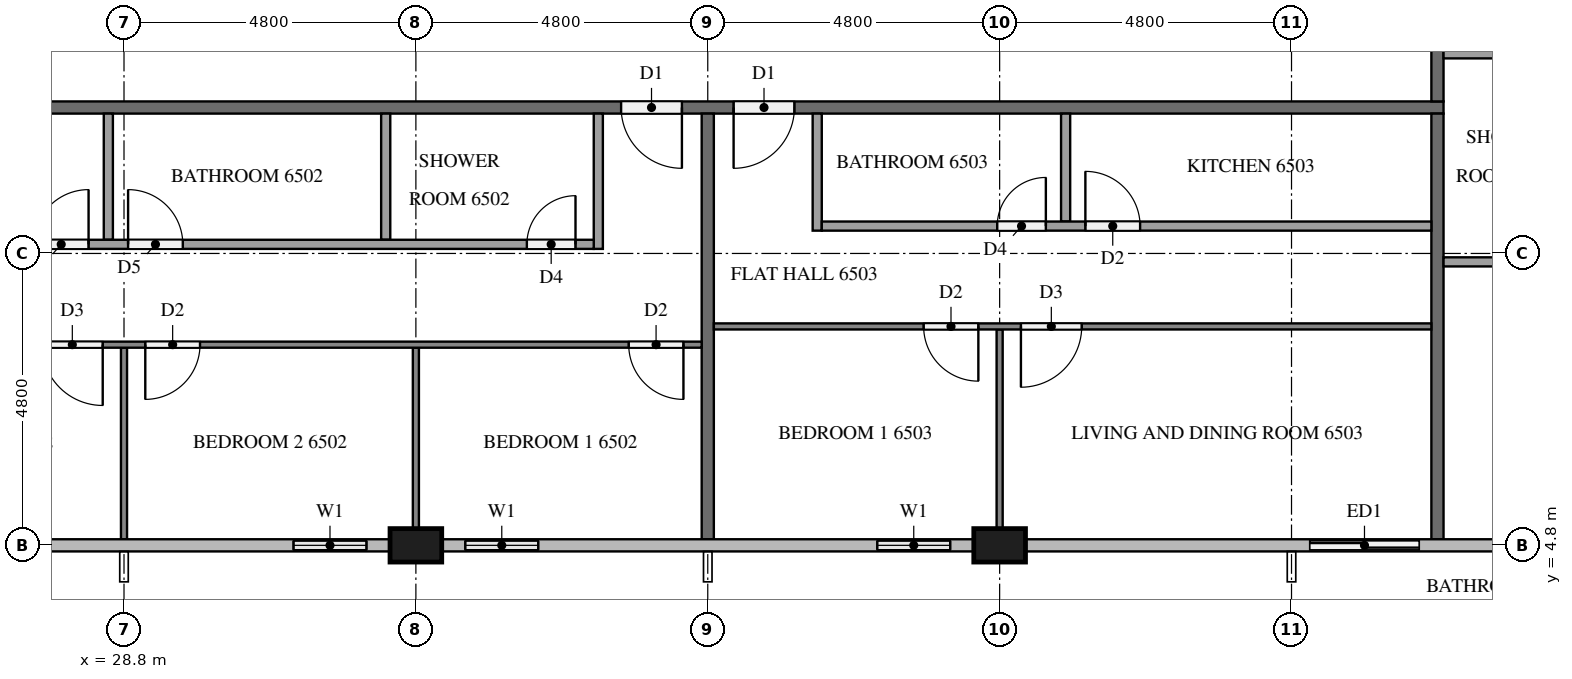
"""IFC4 building model, lengths in metres.
Left out: names, types, materials, properties, quantities, classifications, styles, units other than length and angle.
Written with IfcOpenShell. Run it as: python <this file> out.ifc"""

import sys

from ifc_helpers import new_model, si_unit, direction, frame, frame_2d, origin, origin_2d, place, context, subcontext, project, spatial, rectangle, extrude, element, fill, save


model = new_model("IFC4")
c1 = context("Model", 3, precision=1e-05, world=origin(), true_north=direction((0.0, 1.0)))
c2 = subcontext(c1, "Body", "Model", "MODEL_VIEW")
j1 = project(units=[si_unit("LENGTHUNIT", "METRE"), si_unit("PLANEANGLEUNIT", "RADIAN")], contexts=[c1])
p1 = place(None, origin())
s1 = spatial("IfcSite", under=j1, at=p1, CompositionType="ELEMENT")
p2 = place(p1, origin())
s2 = spatial("IfcBuilding", under=s1, at=p2, CompositionType="ELEMENT")
p3 = place(p2, frame((0.0, 0.0, 249.2)))
s3 = spatial("IfcBuildingStorey", under=s2, at=p3, CompositionType="ELEMENT", Elevation=249.2)
for number, where, z_axis, x_axis in (
    (1, (33.6, 4.8, 0.0), (0.0, 0.0, 1.0), (1.0, 0.0, 0.0)),
    (2, (43.2, 4.8, 0.0), (0.0, 0.0, 1.0), (1.0, 0.0, 0.0)),
):
    element("IfcColumn", number, at=place(p3, frame(where, z_axis=z_axis, x_axis=x_axis)), inside=s3, PredefinedType="COLUMN", context=c2, shape_type="SweptSolid", body=[
        extrude(rectangle(XDim=0.85, YDim=0.55, at=origin_2d()), origin(), (0.0, 0.0, 1.0), 3.2),
    ])
p4 = place(p3, frame((31.2, 4.8, 0.0), z_axis=(0.0, 0.0, 1.0), x_axis=(1.0, 0.0, 0.0)))
e3 = element("IfcWall", 3, at=p4, inside=s3, PredefinedType="SOLIDWALL", context=c2, shape_type="SweptSolid", body=[
    extrude(rectangle(XDim=1.975, YDim=0.15, at=frame_2d((0.988, 0.0))), origin(), (0.0, 0.0, 1.0), 3.2),
])
p5 = place(p4, frame((0.387, 0.0, 0.9)))
e4 = element("IfcOpeningElement", 4, at=p5, cuts=e3, PredefinedType="OPENING", context=c2, shape_type="SweptSolid", body=[
    extrude(rectangle(XDim=1.2, YDim=1.4, at=frame_2d((0.6, 0.7))), frame((0.0, 0.085, 0.0), z_axis=(0.0, -1.0, 0.0), x_axis=(1.0, 0.0, 0.0)), (0.0, 0.0, 1.0), 0.17),
])
p6 = place(p3, frame((34.025, 4.8, 0.0), z_axis=(0.0, 0.0, 1.0), x_axis=(1.0, 0.0, 0.0)))
e5 = element("IfcWall", 5, at=p6, inside=s3, PredefinedType="SOLIDWALL", context=c2, shape_type="SweptSolid", body=[
    extrude(rectangle(XDim=1.975, YDim=0.15, at=frame_2d((0.988, 0.0))), origin(), (0.0, 0.0, 1.0), 3.2),
])
p7 = place(p6, frame((0.387, 0.0, 0.9)))
e6 = element("IfcOpeningElement", 6, at=p7, cuts=e5, PredefinedType="OPENING", context=c2, shape_type="SweptSolid", body=[
    extrude(rectangle(XDim=1.2, YDim=1.4, at=frame_2d((0.6, 0.7))), frame((0.0, 0.085, 0.0), z_axis=(0.0, -1.0, 0.0), x_axis=(1.0, 0.0, 0.0)), (0.0, 0.0, 1.0), 0.17),
])
p8 = place(p3, frame((40.8, 4.8, 0.0), z_axis=(0.0, 0.0, 1.0), x_axis=(1.0, 0.0, 0.0)))
e7 = element("IfcWall", 7, at=p8, inside=s3, PredefinedType="SOLIDWALL", context=c2, shape_type="SweptSolid", body=[
    extrude(rectangle(XDim=1.975, YDim=0.15, at=frame_2d((0.987, 0.0))), origin(), (0.0, 0.0, 1.0), 3.2),
])
p9 = place(p8, frame((0.387, 0.0, 0.9)))
e8 = element("IfcOpeningElement", 8, at=p9, cuts=e7, PredefinedType="OPENING", context=c2, shape_type="SweptSolid", body=[
    extrude(rectangle(XDim=1.2, YDim=1.4, at=frame_2d((0.6, 0.7))), frame((0.0, 0.085, 0.0), z_axis=(0.0, -1.0, 0.0), x_axis=(1.0, 0.0, 0.0)), (0.0, 0.0, 1.0), 0.17),
])
p10 = place(p3, frame((48.0, 4.8, 0.0), z_axis=(0.0, 0.0, 1.0), x_axis=(1.0, 0.0, 0.0)))
e9 = element("IfcWall", 9, at=p10, inside=s3, PredefinedType="SOLIDWALL", context=c2, shape_type="SweptSolid", body=[
    extrude(rectangle(XDim=2.4, YDim=0.15, at=frame_2d((1.2, 0.0))), origin(), (0.0, 0.0, 1.0), 3.2),
])
p11 = place(p10, frame((0.3, 0.0, 0.0)))
e10 = element("IfcOpeningElement", 10, at=p11, cuts=e9, PredefinedType="OPENING", context=c2, shape_type="SweptSolid", body=[
    extrude(rectangle(XDim=1.8, YDim=2.4, at=frame_2d((0.9, 1.2))), frame((0.0, 0.085, 0.0), z_axis=(0.0, -1.0, 0.0), x_axis=(1.0, 0.0, 0.0)), (0.0, 0.0, 1.0), 0.17),
])
p12 = place(p3, frame((50.5, 12.0, 0.0), z_axis=(0.0, 0.0, 1.0), x_axis=(-1.0, 0.0, 0.0)))
e11 = element("IfcWall", 11, at=p12, inside=s3, PredefinedType="PARTITIONING", context=c2, shape_type="SweptSolid", body=[
    extrude(rectangle(XDim=38.6, YDim=0.2, at=frame_2d((19.3, 0.0))), origin(), (0.0, 0.0, 1.0), 3.2),
])
p13 = place(p12, frame((37.075, 0.0, 0.0)))
e12 = element("IfcOpeningElement", 12, at=p13, cuts=e11, PredefinedType="OPENING", context=c2, shape_type="SweptSolid", body=[
    extrude(rectangle(XDim=1.0, YDim=2.1, at=frame_2d((0.5, 1.05))), frame((0.0, 0.11, 0.0), z_axis=(0.0, -1.0, 0.0), x_axis=(1.0, 0.0, 0.0)), (0.0, 0.0, 1.0), 0.22),
])
p14 = place(p12, frame((12.525, 0.0, 0.0)))
e13 = element("IfcOpeningElement", 13, at=p14, cuts=e11, PredefinedType="OPENING", context=c2, shape_type="SweptSolid", body=[
    extrude(rectangle(XDim=1.0, YDim=2.1, at=frame_2d((0.5, 1.05))), frame((0.0, 0.11, 0.0), z_axis=(0.0, -1.0, 0.0), x_axis=(1.0, 0.0, 0.0)), (0.0, 0.0, 1.0), 0.22),
])
p15 = place(p12, frame((10.675, 0.0, 0.0)))
e14 = element("IfcOpeningElement", 14, at=p15, cuts=e11, PredefinedType="OPENING", context=c2, shape_type="SweptSolid", body=[
    extrude(rectangle(XDim=1.0, YDim=2.1, at=frame_2d((0.5, 1.05))), frame((0.0, 0.11, 0.0), z_axis=(0.0, -1.0, 0.0), x_axis=(1.0, 0.0, 0.0)), (0.0, 0.0, 1.0), 0.22),
])
p16 = place(p3, frame((50.4, 40.7, 0.0), z_axis=(0.0, 0.0, 1.0), x_axis=(0.0, -1.0, 0.0)))
e15 = element("IfcWall", 15, at=p16, inside=s3, PredefinedType="PARTITIONING", context=c2, shape_type="SweptSolid", body=[
    extrude(rectangle(XDim=28.6, YDim=0.2, at=frame_2d((14.3, 0.0))), origin(), (0.0, 0.0, 1.0), 3.2),
])
p17 = place(p16, frame((19.525, 0.0, 0.0)))
e16 = element("IfcOpeningElement", 16, at=p17, cuts=e15, PredefinedType="OPENING", context=c2, shape_type="SweptSolid", body=[
    extrude(rectangle(XDim=1.0, YDim=2.1, at=frame_2d((0.5, 1.05))), frame((0.0, 0.11, 0.0), z_axis=(0.0, -1.0, 0.0), x_axis=(1.0, 0.0, 0.0)), (0.0, 0.0, 1.0), 0.22),
])
p18 = place(p16, frame((17.675, 0.0, 0.0)))
e17 = element("IfcOpeningElement", 17, at=p18, cuts=e15, PredefinedType="OPENING", context=c2, shape_type="SweptSolid", body=[
    extrude(rectangle(XDim=1.0, YDim=2.1, at=frame_2d((0.5, 1.05))), frame((0.0, 0.11, 0.0), z_axis=(0.0, -1.0, 0.0), x_axis=(1.0, 0.0, 0.0)), (0.0, 0.0, 1.0), 0.22),
])
p19 = place(p16, frame((0.325, 0.0, 0.0)))
e18 = element("IfcOpeningElement", 18, at=p19, cuts=e15, PredefinedType="OPENING", context=c2, shape_type="SweptSolid", body=[
    extrude(rectangle(XDim=1.0, YDim=2.1, at=frame_2d((0.5, 1.05))), frame((0.0, 0.11, 0.0), z_axis=(0.0, -1.0, 0.0), x_axis=(1.0, 0.0, 0.0)), (0.0, 0.0, 1.0), 0.22),
])
for number, where, z_axis, x_axis in (
    (19, (38.4, 11.9, 0.0), (0.0, 0.0, 1.0), (0.0, -1.0, 0.0)),
    (20, (50.4, 11.9, 0.0), (0.0, 0.0, 1.0), (0.0, -1.0, 0.0)),
):
    element("IfcWall", number, at=place(p3, frame(where, z_axis=z_axis, x_axis=x_axis)), inside=s3, PredefinedType="PARTITIONING", context=c2, shape_type="SweptSolid", body=[
        extrude(rectangle(XDim=7.0, YDim=0.2, at=frame_2d((3.5, 0.0))), origin(), (0.0, 0.0, 1.0), 3.2),
    ])
p20 = place(p3, frame((33.6, 8.05, 0.0), z_axis=(0.0, 0.0, 1.0), x_axis=(0.0, -1.0, 0.0)))
e21 = element("IfcWall", 21, at=p20, inside=s3, PredefinedType="PARTITIONING", context=c2, shape_type="SweptSolid", body=[
    extrude(rectangle(XDim=2.975, YDim=0.1, at=frame_2d((1.488, 0.0))), origin(), (0.0, 0.0, 1.0), 3.2),
])
p21 = place(p3, frame((28.8, 8.05, 0.0), z_axis=(0.0, 0.0, 1.0), x_axis=(0.0, -1.0, 0.0)))
e22 = element("IfcWall", 22, at=p21, inside=s3, PredefinedType="PARTITIONING", context=c2, shape_type="SweptSolid", body=[
    extrude(rectangle(XDim=3.15, YDim=0.1, at=frame_2d((1.575, 0.0))), origin(), (0.0, 0.0, 1.0), 3.2),
])
p22 = place(p3, frame((38.3, 8.1, 0.0), z_axis=(0.0, 0.0, 1.0), x_axis=(-1.0, 0.0, 0.0)))
e23 = element("IfcWall", 23, at=p22, inside=s3, PredefinedType="PARTITIONING", context=c2, shape_type="SweptSolid", body=[
    extrude(rectangle(XDim=16.6, YDim=0.1, at=frame_2d((8.3, 0.0))), origin(), (0.0, 0.0, 1.0), 3.2),
])
p23 = place(p22, frame((0.3, 0.0, 0.0)))
e24 = element("IfcOpeningElement", 24, at=p23, cuts=e23, PredefinedType="OPENING", context=c2, shape_type="SweptSolid", body=[
    extrude(rectangle(XDim=0.9, YDim=2.1, at=frame_2d((0.45, 1.05))), frame((0.0, 0.06, 0.0), z_axis=(0.0, -1.0, 0.0), x_axis=(1.0, 0.0, 0.0)), (0.0, 0.0, 1.0), 0.12),
])
p24 = place(p22, frame((8.25, 0.0, 0.0)))
e25 = element("IfcOpeningElement", 25, at=p24, cuts=e23, PredefinedType="OPENING", context=c2, shape_type="SweptSolid", body=[
    extrude(rectangle(XDim=0.9, YDim=2.1, at=frame_2d((0.45, 1.05))), frame((0.0, 0.06, 0.0), z_axis=(0.0, -1.0, 0.0), x_axis=(1.0, 0.0, 0.0)), (0.0, 0.0, 1.0), 0.12),
])
p25 = place(p22, frame((9.85, 0.0, 0.0)))
e26 = element("IfcOpeningElement", 26, at=p25, cuts=e23, PredefinedType="OPENING", context=c2, shape_type="SweptSolid", body=[
    extrude(rectangle(XDim=1.0, YDim=2.1, at=frame_2d((0.5, 1.05))), frame((0.0, 0.06, 0.0), z_axis=(0.0, -1.0, 0.0), x_axis=(1.0, 0.0, 0.0)), (0.0, 0.0, 1.0), 0.12),
])
for number, where, z_axis, x_axis in (
    (27, (33.104, 11.9, 0.0), (0.0, 0.0, 1.0), (0.0, -1.0, 0.0)),
    (28, (28.542, 11.9, 0.0), (0.0, 0.0, 1.0), (0.0, -1.0, 0.0)),
):
    element("IfcWall", number, at=place(p3, frame(where, z_axis=z_axis, x_axis=x_axis)), inside=s3, PredefinedType="PARTITIONING", context=c2, shape_type="SweptSolid", body=[
        extrude(rectangle(XDim=2.075, YDim=0.15, at=frame_2d((1.038, 0.0))), origin(), (0.0, 0.0, 1.0), 3.2),
    ])
p26 = place(p3, frame((36.6, 11.9, 0.0), z_axis=(0.0, 0.0, 1.0), x_axis=(0.0, -1.0, 0.0)))
e29 = element("IfcWall", 29, at=p26, inside=s3, PredefinedType="PARTITIONING", context=c2, shape_type="SweptSolid", body=[
    extrude(rectangle(XDim=2.225, YDim=0.15, at=frame_2d((1.112, 0.0))), origin(), (0.0, 0.0, 1.0), 3.2),
])
p27 = place(p3, frame((21.7, 9.75, 0.0), z_axis=(0.0, 0.0, 1.0), x_axis=(1.0, 0.0, 0.0)))
e30 = element("IfcWall", 30, at=p27, inside=s3, PredefinedType="PARTITIONING", context=c2, shape_type="SweptSolid", body=[
    extrude(rectangle(XDim=14.825, YDim=0.15, at=frame_2d((7.413, 0.0))), origin(), (0.0, 0.0, 1.0), 3.2),
])
p28 = place(p27, frame((13.725, 0.0, 0.0)))
e31 = element("IfcOpeningElement", 31, at=p28, cuts=e30, PredefinedType="OPENING", context=c2, shape_type="SweptSolid", body=[
    extrude(rectangle(XDim=0.8, YDim=2.1, at=frame_2d((0.4, 1.05))), frame((0.0, 0.085, 0.0), z_axis=(0.0, -1.0, 0.0), x_axis=(1.0, 0.0, 0.0)), (0.0, 0.0, 1.0), 0.17),
])
p29 = place(p27, frame((7.167, 0.0, 0.0)))
e32 = element("IfcOpeningElement", 32, at=p29, cuts=e30, PredefinedType="OPENING", context=c2, shape_type="SweptSolid", body=[
    extrude(rectangle(XDim=0.9, YDim=2.1, at=frame_2d((0.45, 1.05))), frame((0.0, 0.085, 0.0), z_axis=(0.0, -1.0, 0.0), x_axis=(1.0, 0.0, 0.0)), (0.0, 0.0, 1.0), 0.17),
])
p30 = place(p27, frame((5.617, 0.0, 0.0)))
e33 = element("IfcOpeningElement", 33, at=p30, cuts=e30, PredefinedType="OPENING", context=c2, shape_type="SweptSolid", body=[
    extrude(rectangle(XDim=0.9, YDim=2.1, at=frame_2d((0.45, 1.05))), frame((0.0, 0.085, 0.0), z_axis=(0.0, -1.0, 0.0), x_axis=(1.0, 0.0, 0.0)), (0.0, 0.0, 1.0), 0.17),
])
p31 = place(p3, frame((43.2, 8.35, 0.0), z_axis=(0.0, 0.0, 1.0), x_axis=(0.0, -1.0, 0.0)))
e34 = element("IfcWall", 34, at=p31, inside=s3, PredefinedType="PARTITIONING", context=c2, shape_type="SweptSolid", body=[
    extrude(rectangle(XDim=3.275, YDim=0.1, at=frame_2d((1.638, 0.0))), origin(), (0.0, 0.0, 1.0), 3.2),
])
p32 = place(p3, frame((50.3, 8.4, 0.0), z_axis=(0.0, 0.0, 1.0), x_axis=(-1.0, 0.0, 0.0)))
e35 = element("IfcWall", 35, at=p32, inside=s3, PredefinedType="PARTITIONING", context=c2, shape_type="SweptSolid", body=[
    extrude(rectangle(XDim=11.8, YDim=0.1, at=frame_2d((5.9, 0.0))), origin(), (0.0, 0.0, 1.0), 3.2),
])
p33 = place(p32, frame((7.45, 0.0, 0.0)))
e36 = element("IfcOpeningElement", 36, at=p33, cuts=e35, PredefinedType="OPENING", context=c2, shape_type="SweptSolid", body=[
    extrude(rectangle(XDim=0.9, YDim=2.1, at=frame_2d((0.45, 1.05))), frame((0.0, 0.06, 0.0), z_axis=(0.0, -1.0, 0.0), x_axis=(1.0, 0.0, 0.0)), (0.0, 0.0, 1.0), 0.12),
])
p34 = place(p32, frame((5.75, 0.0, 0.0)))
e37 = element("IfcOpeningElement", 37, at=p34, cuts=e35, PredefinedType="OPENING", context=c2, shape_type="SweptSolid", body=[
    extrude(rectangle(XDim=1.0, YDim=2.1, at=frame_2d((0.5, 1.05))), frame((0.0, 0.06, 0.0), z_axis=(0.0, -1.0, 0.0), x_axis=(1.0, 0.0, 0.0)), (0.0, 0.0, 1.0), 0.12),
])
p35 = place(p3, frame((44.285, 11.9, 0.0), z_axis=(0.0, 0.0, 1.0), x_axis=(0.0, -1.0, 0.0)))
e38 = element("IfcWall", 38, at=p35, inside=s3, PredefinedType="PARTITIONING", context=c2, shape_type="SweptSolid", body=[
    extrude(rectangle(XDim=1.775, YDim=0.15, at=frame_2d((0.887, 0.0))), origin(), (0.0, 0.0, 1.0), 3.2),
])
p36 = place(p3, frame((40.2, 11.9, 0.0), z_axis=(0.0, 0.0, 1.0), x_axis=(0.0, -1.0, 0.0)))
e39 = element("IfcWall", 39, at=p36, inside=s3, PredefinedType="PARTITIONING", context=c2, shape_type="SweptSolid", body=[
    extrude(rectangle(XDim=1.925, YDim=0.15, at=frame_2d((0.962, 0.0))), origin(), (0.0, 0.0, 1.0), 3.2),
])
p37 = place(p3, frame((40.275, 10.05, 0.0), z_axis=(0.0, 0.0, 1.0), x_axis=(1.0, 0.0, 0.0)))
e40 = element("IfcWall", 40, at=p37, inside=s3, PredefinedType="PARTITIONING", context=c2, shape_type="SweptSolid", body=[
    extrude(rectangle(XDim=10.025, YDim=0.15, at=frame_2d((5.013, 0.0))), origin(), (0.0, 0.0, 1.0), 3.2),
])
p38 = place(p37, frame((2.885, 0.0, 0.0)))
e41 = element("IfcOpeningElement", 41, at=p38, cuts=e40, PredefinedType="OPENING", context=c2, shape_type="SweptSolid", body=[
    extrude(rectangle(XDim=0.8, YDim=2.1, at=frame_2d((0.4, 1.05))), frame((0.0, 0.085, 0.0), z_axis=(0.0, -1.0, 0.0), x_axis=(1.0, 0.0, 0.0)), (0.0, 0.0, 1.0), 0.17),
])
p39 = place(p37, frame((4.335, 0.0, 0.0)))
e42 = element("IfcOpeningElement", 42, at=p39, cuts=e40, PredefinedType="OPENING", context=c2, shape_type="SweptSolid", body=[
    extrude(rectangle(XDim=0.9, YDim=2.1, at=frame_2d((0.45, 1.05))), frame((0.0, 0.085, 0.0), z_axis=(0.0, -1.0, 0.0), x_axis=(1.0, 0.0, 0.0)), (0.0, 0.0, 1.0), 0.17),
])
for number, where, z_axis, x_axis in (
    (43, (50.5, 12.883, 0.0), (0.0, 0.0, 1.0), (1.0, 0.0, 0.0)),
    (44, (50.5, 9.461, 0.0), (0.0, 0.0, 1.0), (1.0, 0.0, 0.0)),
):
    element("IfcWall", number, at=place(p3, frame(where, z_axis=z_axis, x_axis=x_axis)), inside=s3, PredefinedType="PARTITIONING", context=c2, shape_type="SweptSolid", body=[
        extrude(rectangle(XDim=2.075, YDim=0.15, at=frame_2d((1.038, 0.0))), origin(), (0.0, 0.0, 1.0), 3.2),
    ])
p40 = place(p5, origin())
e45 = element("IfcWindow", 45, at=p40, inside=s3, PartitioningType="SINGLE_PANEL", PredefinedType="WINDOW", context=c2, shape_type="SweptSolid", body=[
    extrude(rectangle(XDim=1.2, YDim=1.4, at=frame_2d((0.6, 0.7))), frame((0.0, 0.03, 0.0), z_axis=(0.0, -1.0, 0.0), x_axis=(1.0, 0.0, 0.0)), (0.0, 0.0, 1.0), 0.06),
])
fill(e4, e45)
p41 = place(p7, origin())
e46 = element("IfcWindow", 46, at=p41, inside=s3, PartitioningType="SINGLE_PANEL", PredefinedType="WINDOW", context=c2, shape_type="SweptSolid", body=[
    extrude(rectangle(XDim=1.2, YDim=1.4, at=frame_2d((0.6, 0.7))), frame((0.0, 0.03, 0.0), z_axis=(0.0, -1.0, 0.0), x_axis=(1.0, 0.0, 0.0)), (0.0, 0.0, 1.0), 0.06),
])
fill(e6, e46)
p42 = place(p9, origin())
e47 = element("IfcWindow", 47, at=p42, inside=s3, PartitioningType="SINGLE_PANEL", PredefinedType="WINDOW", context=c2, shape_type="SweptSolid", body=[
    extrude(rectangle(XDim=1.2, YDim=1.4, at=frame_2d((0.6, 0.7))), frame((0.0, 0.03, 0.0), z_axis=(0.0, -1.0, 0.0), x_axis=(1.0, 0.0, 0.0)), (0.0, 0.0, 1.0), 0.06),
])
fill(e8, e47)
p43 = place(p11, origin())
e48 = element("IfcDoor", 48, at=p43, inside=s3, OperationType="SLIDING_TO_RIGHT", PredefinedType="DOOR", context=c2, shape_type="SweptSolid", body=[
    extrude(rectangle(XDim=1.8, YDim=2.4, at=frame_2d((0.9, 1.2))), frame((0.0, 0.025, 0.0), z_axis=(0.0, -1.0, 0.0), x_axis=(1.0, 0.0, 0.0)), (0.0, 0.0, 1.0), 0.05),
])
fill(e10, e48)
p44 = place(p14, origin())
e49 = element("IfcDoor", 49, at=p44, inside=s3, OperationType="SINGLE_SWING_LEFT", PredefinedType="DOOR", context=c2, shape_type="SweptSolid", body=[
    extrude(rectangle(XDim=1.0, YDim=2.1, at=frame_2d((0.5, 1.05))), frame((0.0, 0.025, 0.0), z_axis=(0.0, -1.0, 0.0), x_axis=(1.0, 0.0, 0.0)), (0.0, 0.0, 1.0), 0.05),
])
fill(e13, e49)
p45 = place(p15, origin())
e50 = element("IfcDoor", 50, at=p45, inside=s3, OperationType="SINGLE_SWING_RIGHT", PredefinedType="DOOR", context=c2, shape_type="SweptSolid", body=[
    extrude(rectangle(XDim=1.0, YDim=2.1, at=frame_2d((0.5, 1.05))), frame((0.0, 0.025, 0.0), z_axis=(0.0, -1.0, 0.0), x_axis=(1.0, 0.0, 0.0)), (0.0, 0.0, 1.0), 0.05),
])
fill(e14, e50)
p46 = place(p23, origin())
e51 = element("IfcDoor", 51, at=p46, inside=s3, OperationType="SINGLE_SWING_LEFT", PredefinedType="DOOR", context=c2, shape_type="SweptSolid", body=[
    extrude(rectangle(XDim=0.9, YDim=2.1, at=frame_2d((0.45, 1.05))), frame((0.0, 0.025, 0.0), z_axis=(0.0, -1.0, 0.0), x_axis=(1.0, 0.0, 0.0)), (0.0, 0.0, 1.0), 0.05),
])
fill(e24, e51)
p47 = place(p24, origin())
e52 = element("IfcDoor", 52, at=p47, inside=s3, OperationType="SINGLE_SWING_RIGHT", PredefinedType="DOOR", context=c2, shape_type="SweptSolid", body=[
    extrude(rectangle(XDim=0.9, YDim=2.1, at=frame_2d((0.45, 1.05))), frame((0.0, 0.025, 0.0), z_axis=(0.0, -1.0, 0.0), x_axis=(1.0, 0.0, 0.0)), (0.0, 0.0, 1.0), 0.05),
])
fill(e25, e52)
p48 = place(p25, origin())
e53 = element("IfcDoor", 53, at=p48, inside=s3, OperationType="SINGLE_SWING_LEFT", PredefinedType="DOOR", context=c2, shape_type="SweptSolid", body=[
    extrude(rectangle(XDim=1.0, YDim=2.1, at=frame_2d((0.5, 1.05))), frame((0.0, 0.025, 0.0), z_axis=(0.0, -1.0, 0.0), x_axis=(1.0, 0.0, 0.0)), (0.0, 0.0, 1.0), 0.05),
])
fill(e26, e53)
p49 = place(p28, origin())
e54 = element("IfcDoor", 54, at=p49, inside=s3, OperationType="SINGLE_SWING_RIGHT", PredefinedType="DOOR", context=c2, shape_type="SweptSolid", body=[
    extrude(rectangle(XDim=0.8, YDim=2.1, at=frame_2d((0.4, 1.05))), frame((0.0, 0.025, 0.0), z_axis=(0.0, -1.0, 0.0), x_axis=(1.0, 0.0, 0.0)), (0.0, 0.0, 1.0), 0.05),
])
fill(e31, e54)
p50 = place(p29, origin())
e55 = element("IfcDoor", 55, at=p50, inside=s3, OperationType="SINGLE_SWING_LEFT", PredefinedType="DOOR", context=c2, shape_type="SweptSolid", body=[
    extrude(rectangle(XDim=0.9, YDim=2.1, at=frame_2d((0.45, 1.05))), frame((0.0, 0.025, 0.0), z_axis=(0.0, -1.0, 0.0), x_axis=(1.0, 0.0, 0.0)), (0.0, 0.0, 1.0), 0.05),
])
fill(e32, e55)
p51 = place(p30, origin())
e56 = element("IfcDoor", 56, at=p51, inside=s3, OperationType="SINGLE_SWING_RIGHT", PredefinedType="DOOR", context=c2, shape_type="SweptSolid", body=[
    extrude(rectangle(XDim=0.9, YDim=2.1, at=frame_2d((0.45, 1.05))), frame((0.0, 0.025, 0.0), z_axis=(0.0, -1.0, 0.0), x_axis=(1.0, 0.0, 0.0)), (0.0, 0.0, 1.0), 0.05),
])
fill(e33, e56)
p52 = place(p33, origin())
e57 = element("IfcDoor", 57, at=p52, inside=s3, OperationType="SINGLE_SWING_LEFT", PredefinedType="DOOR", context=c2, shape_type="SweptSolid", body=[
    extrude(rectangle(XDim=0.9, YDim=2.1, at=frame_2d((0.45, 1.05))), frame((0.0, 0.025, 0.0), z_axis=(0.0, -1.0, 0.0), x_axis=(1.0, 0.0, 0.0)), (0.0, 0.0, 1.0), 0.05),
])
fill(e36, e57)
p53 = place(p34, origin())
e58 = element("IfcDoor", 58, at=p53, inside=s3, OperationType="SINGLE_SWING_RIGHT", PredefinedType="DOOR", context=c2, shape_type="SweptSolid", body=[
    extrude(rectangle(XDim=1.0, YDim=2.1, at=frame_2d((0.5, 1.05))), frame((0.0, 0.025, 0.0), z_axis=(0.0, -1.0, 0.0), x_axis=(1.0, 0.0, 0.0)), (0.0, 0.0, 1.0), 0.05),
])
fill(e37, e58)
p54 = place(p38, origin())
e59 = element("IfcDoor", 59, at=p54, inside=s3, OperationType="SINGLE_SWING_RIGHT", PredefinedType="DOOR", context=c2, shape_type="SweptSolid", body=[
    extrude(rectangle(XDim=0.8, YDim=2.1, at=frame_2d((0.4, 1.05))), frame((0.0, 0.025, 0.0), z_axis=(0.0, -1.0, 0.0), x_axis=(1.0, 0.0, 0.0)), (0.0, 0.0, 1.0), 0.05),
])
fill(e41, e59)
p55 = place(p39, origin())
e60 = element("IfcDoor", 60, at=p55, inside=s3, OperationType="SINGLE_SWING_LEFT", PredefinedType="DOOR", context=c2, shape_type="SweptSolid", body=[
    extrude(rectangle(XDim=0.9, YDim=2.1, at=frame_2d((0.45, 1.05))), frame((0.0, 0.025, 0.0), z_axis=(0.0, -1.0, 0.0), x_axis=(1.0, 0.0, 0.0)), (0.0, 0.0, 1.0), 0.05),
])
fill(e42, e60)
save(model, sys.argv[1])
